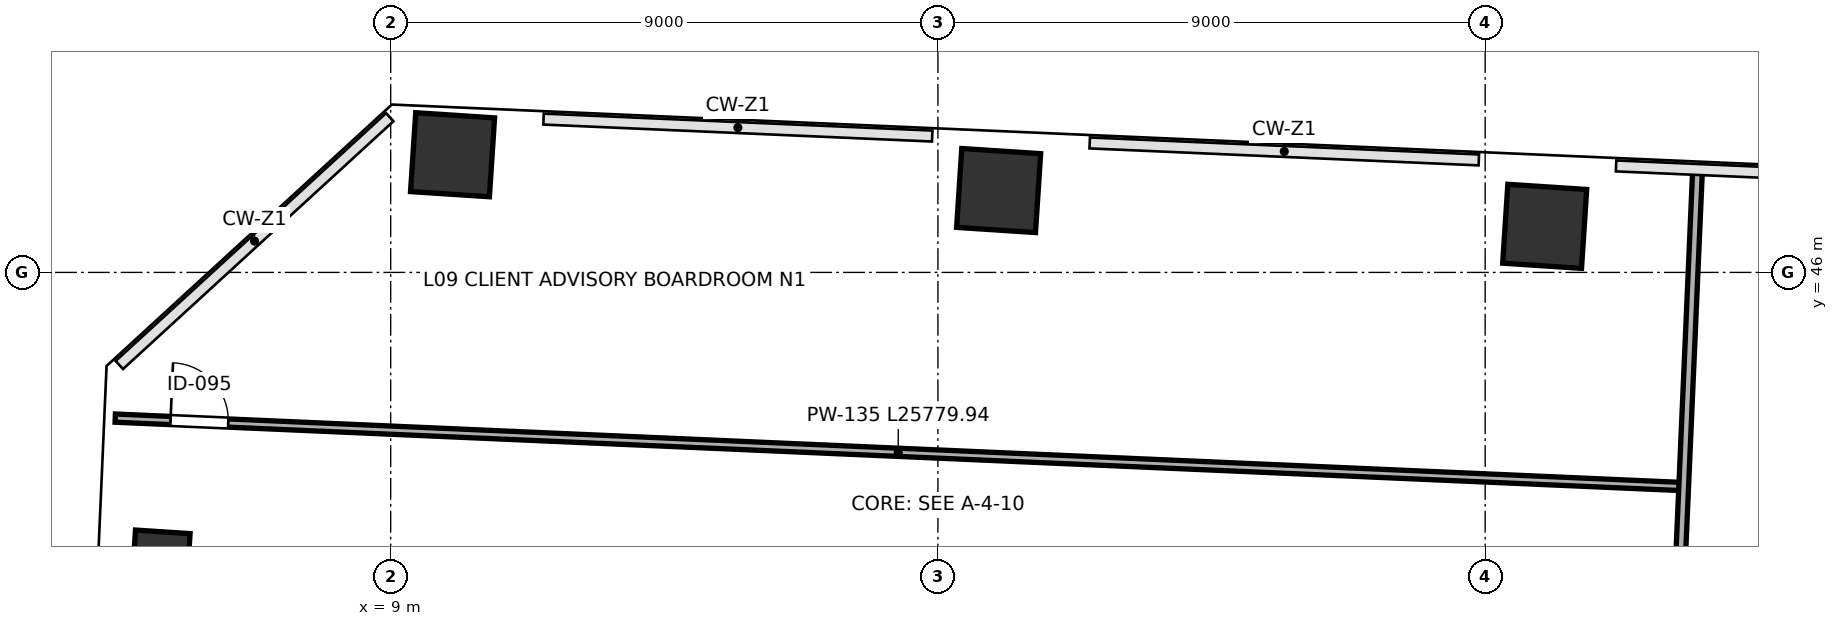
"""IFC4 building model, lengths in metres.
Left out: names, types, materials, properties, quantities, classifications, styles, units other than length and angle.
Written with IfcOpenShell. Run it as: python <this file> out.ifc"""

import sys

from ifc_helpers import new_model, si_unit, direction, frame, frame_2d, origin, origin_2d, place, context, subcontext, project, spatial, rectangle, extrude, clip, halfspace, source, transform, mapped, element, fill, save


model = new_model("IFC4")
c1 = context("Model", 3, precision=1e-05, world=origin(), true_north=direction((0.0, 1.0)))
c2 = subcontext(c1, "Body", "Model", "MODEL_VIEW")
j1 = project(units=[si_unit("LENGTHUNIT", "METRE"), si_unit("PLANEANGLEUNIT", "RADIAN")], contexts=[c1])
p1 = place(None, origin())
s1 = spatial("IfcSite", under=j1, at=p1, CompositionType="ELEMENT")
p2 = place(p1, origin())
s2 = spatial("IfcBuilding", under=s1, at=p2, CompositionType="ELEMENT")
p3 = place(p2, frame((0.0, 0.0, 42.4)))
s3 = spatial("IfcBuildingStorey", under=s2, at=p3, CompositionType="ELEMENT", Elevation=42.4)
p4 = place(p3, frame((10.018, 47.935, 0.0), z_axis=(0.072697958325, 0.051217864715, 0.996038019952), x_axis=(0.52145726239, -0.853257578553, 0.005816196551)))
e1 = element("IfcColumn", 1, at=p4, inside=s3, PredefinedType="COLUMN", context=c2, shape_type="Clipping", body=[
    clip(clip(extrude(rectangle(XDim=1.3, YDim=1.3, at=origin_2d()), origin(), (0.0, 0.0, 1.0), 4.819), halfspace(frame((0.0, 0.0, 0.062), z_axis=(0.0, 0.0, -1.0), x_axis=(1.0, 0.0, 0.0)), False)), halfspace(frame((0.0, 0.0, 4.757), z_axis=(0.0, 0.0, 1.0), x_axis=(1.0, 0.0, 0.0)), False)),
])
p5 = place(p3, frame((18.998, 47.346, 0.0), z_axis=(0.06971059334, 0.010603721986, 0.997510899317), x_axis=(0.08556043802, -0.996322308968, 0.004611734944)))
e2 = element("IfcColumn", 2, at=p5, inside=s3, PredefinedType="COLUMN", context=c2, shape_type="Clipping", body=[
    clip(clip(extrude(rectangle(XDim=1.3, YDim=1.3, at=origin_2d()), origin(), (0.0, 0.0, 1.0), 4.812), halfspace(frame((0.0, 0.0, 0.05), z_axis=(0.0, 0.0, -1.0), x_axis=(1.0, 0.0, 0.0)), False)), halfspace(frame((0.0, 0.0, 4.762), z_axis=(0.0, 0.0, 1.0), x_axis=(1.0, 0.0, 0.0)), False)),
])
p6 = place(p3, frame((27.979, 46.758, 0.0), z_axis=(0.066603379117, -0.030080581734, 0.997325999106), x_axis=(-0.470170594703, -0.882562613084, 0.004779734565)))
e3 = element("IfcColumn", 3, at=p6, inside=s3, PredefinedType="COLUMN", context=c2, shape_type="Clipping", body=[
    clip(clip(extrude(rectangle(XDim=1.3, YDim=1.3, at=origin_2d()), origin(), (0.0, 0.0, 1.0), 4.813), halfspace(frame((0.0, 0.0, 0.051), z_axis=(0.0, 0.0, -1.0), x_axis=(1.0, 0.0, 0.0)), False)), halfspace(frame((0.0, 0.0, 4.762), z_axis=(0.0, 0.0, 1.0), x_axis=(1.0, 0.0, 0.0)), False)),
])
p7 = place(p3, frame((5.209, 41.085, 0.0), z_axis=(0.041963394257, 0.073283898666, 0.996427891891), x_axis=(0.833557933495, -0.552404440794, 0.005523160188)))
e4 = element("IfcColumn", 4, at=p7, inside=s3, PredefinedType="PILASTER", context=c2, shape_type="Clipping", body=[
    clip(clip(extrude(rectangle(XDim=0.9, YDim=1.3, at=origin_2d()), origin(), (0.0, 0.0, 1.0), 4.817), halfspace(frame((0.0, 0.0, 0.058), z_axis=(0.0, 0.0, -1.0), x_axis=(1.0, 0.0, 0.0)), False)), halfspace(frame((0.0, 0.0, 4.759), z_axis=(0.0, 0.0, 1.0), x_axis=(1.0, 0.0, 0.0)), False)),
])
p8 = place(p3, frame((4.47, 43.604, 0.0), z_axis=(0.0, 0.0, 1.0), x_axis=(0.999047795436, -0.04362914662, 0.0)))
e5 = element("IfcWall", 5, at=p8, inside=s3, PredefinedType="PARTITIONING", context=c2, shape_type="SweptSolid", body=[
    extrude(rectangle(XDim=25.78, YDim=0.135, at=frame_2d((12.89, 0.0))), origin(), (0.0, 0.0, 1.0), 4.56),
])
p9 = place(p8, frame((0.91, 0.0, 0.0)))
e6 = element("IfcOpeningElement", 6, at=p9, cuts=e5, PredefinedType="OPENING", context=c2, shape_type="SweptSolid", body=[
    extrude(rectangle(XDim=0.95, YDim=2.15, at=frame_2d((0.475, 1.075))), frame((0.0, 0.078, 0.0), z_axis=(0.0, -1.0, 0.0), x_axis=(1.0, 0.0, 0.0)), (0.0, 0.0, 1.0), 0.155),
])
p10 = place(p3, frame((29.625, 27.822, 0.0), z_axis=(0.0, 0.0, 1.0), x_axis=(0.043623060059, 0.999048061222, 0.0)))
e7 = element("IfcWall", 7, at=p10, inside=s3, PredefinedType="PARTITIONING", context=c2, shape_type="SweptSolid", body=[
    extrude(rectangle(XDim=19.84, YDim=0.16, at=frame_2d((9.92, 0.0))), origin(), (0.0, 0.0, 1.0), 3.695),
])
m1 = source(origin(), c2, "Body", "SweptSolid", [
    extrude(rectangle(XDim=0.95, YDim=2.15, at=frame_2d((0.475, 1.075))), frame((0.0, 0.025, 0.0), z_axis=(0.0, -1.0, 0.0), x_axis=(1.0, 0.0, 0.0)), (0.0, 0.0, 1.0), 0.05),
])
p11 = place(p9, origin())
e8 = element("IfcDoor", 8, at=p11, inside=s3, OperationType="SINGLE_SWING_LEFT", PredefinedType="DOOR", context=c2, shape_type="MappedRepresentation", body=[
    mapped(m1, transform((0.0, 0.0, 0.0), scale=1.0)),
])
fill(e6, e8)
save(model, sys.argv[1])
